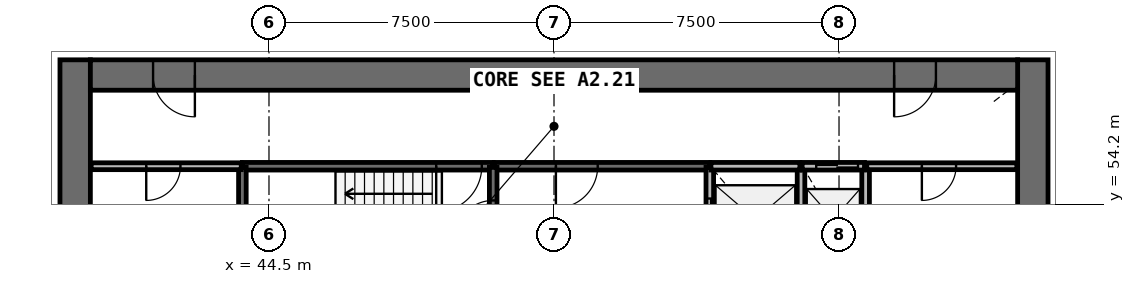
"""IFC4 building model, lengths in metres.
Left out: names, types, materials, properties, quantities, classifications, styles, units other than length and angle.
Written with IfcOpenShell. Run it as: python <this file> out.ifc"""

import sys

from ifc_helpers import new_model, si_unit, direction, frame, frame_2d, origin, place, context, subcontext, project, spatial, rectangle, extrude, source, transform, mapped, element, fill, save


model = new_model("IFC4")
c1 = context("Model", 3, precision=1e-05, world=origin(), true_north=direction((0.0, 1.0)))
c2 = subcontext(c1, "Body", "Model", "MODEL_VIEW")
j1 = project(units=[si_unit("LENGTHUNIT", "METRE"), si_unit("PLANEANGLEUNIT", "RADIAN")], contexts=[c1])
p1 = place(None, origin())
s1 = spatial("IfcSite", under=j1, at=p1, CompositionType="ELEMENT")
p2 = place(p1, origin())
s2 = spatial("IfcBuilding", under=s1, at=p2, CompositionType="ELEMENT")
p3 = place(p2, frame((0.0, 0.0, 88.0)))
s3 = spatial("IfcBuildingStorey", under=s2, at=p3, CompositionType="ELEMENT", Elevation=88.0)
p4 = place(p3, frame((64.6, 38.0, 0.0), z_axis=(0.0, 0.0, 1.0), x_axis=(0.0, 1.0, 0.0)))
e1 = element("IfcWall", 1, at=p4, inside=s3, PredefinedType="SHEAR", context=c2, shape_type="SweptSolid", body=[
    extrude(rectangle(XDim=20.0, YDim=0.8, at=frame_2d((10.0, 0.0))), origin(), (0.0, 0.0, 1.0), 4.1),
])
p5 = place(p4, frame((9.1, 0.0, 0.0)))
e2 = element("IfcOpeningElement", 2, at=p5, cuts=e1, PredefinedType="OPENING", context=c2, shape_type="SweptSolid", body=[
    extrude(rectangle(XDim=1.8, YDim=2.1, at=frame_2d((0.9, 1.05))), frame((0.0, 0.41, 0.0), z_axis=(0.0, -1.0, 0.0), x_axis=(1.0, 0.0, 0.0)), (0.0, 0.0, 1.0), 0.82),
])
p6 = place(p3, frame((39.4, 58.0, 0.0), z_axis=(0.0, 0.0, 1.0), x_axis=(0.0, -1.0, 0.0)))
e3 = element("IfcWall", 3, at=p6, inside=s3, PredefinedType="SHEAR", context=c2, shape_type="SweptSolid", body=[
    extrude(rectangle(XDim=20.0, YDim=0.8, at=frame_2d((10.0, 0.0))), origin(), (0.0, 0.0, 1.0), 4.1),
])
p7 = place(p6, frame((9.1, 0.0, 0.0)))
e4 = element("IfcOpeningElement", 4, at=p7, cuts=e3, PredefinedType="OPENING", context=c2, shape_type="SweptSolid", body=[
    extrude(rectangle(XDim=1.8, YDim=2.1, at=frame_2d((0.9, 1.05))), frame((0.0, 0.41, 0.0), z_axis=(0.0, -1.0, 0.0), x_axis=(1.0, 0.0, 0.0)), (0.0, 0.0, 1.0), 0.82),
])
p8 = place(p3, frame((64.2, 57.6, 0.0), z_axis=(0.0, 0.0, 1.0), x_axis=(-1.0, 0.0, 0.0)))
e5 = element("IfcWall", 5, at=p8, inside=s3, PredefinedType="SHEAR", context=c2, shape_type="SweptSolid", body=[
    extrude(rectangle(XDim=24.4, YDim=0.8, at=frame_2d((12.2, 0.0))), origin(), (0.0, 0.0, 1.0), 4.1),
])
p9 = place(p8, frame((21.65, 0.0, 0.0)))
e6 = element("IfcOpeningElement", 6, at=p9, cuts=e5, PredefinedType="OPENING", context=c2, shape_type="SweptSolid", body=[
    extrude(rectangle(XDim=1.1, YDim=2.1, at=frame_2d((0.55, 1.05))), frame((0.0, 0.41, 0.0), z_axis=(0.0, -1.0, 0.0), x_axis=(1.0, 0.0, 0.0)), (0.0, 0.0, 1.0), 0.82),
])
p10 = place(p8, frame((2.15, 0.0, 0.0)))
e7 = element("IfcOpeningElement", 7, at=p10, cuts=e5, PredefinedType="OPENING", context=c2, shape_type="SweptSolid", body=[
    extrude(rectangle(XDim=1.1, YDim=2.1, at=frame_2d((0.55, 1.05))), frame((0.0, 0.41, 0.0), z_axis=(0.0, -1.0, 0.0), x_axis=(1.0, 0.0, 0.0)), (0.0, 0.0, 1.0), 0.82),
])
p11 = place(p3, frame((50.4, 55.2, 0.0), z_axis=(0.0, 0.0, 1.0), x_axis=(-1.0, 0.0, 0.0)))
e8 = element("IfcWall", 8, at=p11, inside=s3, PredefinedType="SOLIDWALL", context=c2, shape_type="SweptSolid", body=[
    extrude(rectangle(XDim=6.6, YDim=0.2, at=frame_2d((3.3, 0.0))), origin(), (0.0, 0.0, 1.0), 3.7),
])
p12 = place(p11, frame((0.3, 0.0, 0.0)))
e9 = element("IfcOpeningElement", 9, at=p12, cuts=e8, PredefinedType="OPENING", context=c2, shape_type="SweptSolid", body=[
    extrude(rectangle(XDim=1.2, YDim=2.1, at=frame_2d((0.6, 1.05))), frame((0.0, 0.11, 0.0), z_axis=(0.0, -1.0, 0.0), x_axis=(1.0, 0.0, 0.0)), (0.0, 0.0, 1.0), 0.22),
])
p13 = place(p3, frame((56.1, 55.2, 0.0), z_axis=(0.0, 0.0, 1.0), x_axis=(-1.0, 0.0, 0.0)))
e10 = element("IfcWall", 10, at=p13, inside=s3, PredefinedType="SOLIDWALL", context=c2, shape_type="SweptSolid", body=[
    extrude(rectangle(XDim=5.67, YDim=0.2, at=frame_2d((2.835, 0.0))), origin(), (0.0, 0.0, 1.0), 3.7),
])
p14 = place(p13, frame((2.95, 0.0, 0.0)))
e11 = element("IfcOpeningElement", 11, at=p14, cuts=e10, PredefinedType="OPENING", context=c2, shape_type="SweptSolid", body=[
    extrude(rectangle(XDim=1.1, YDim=2.1, at=frame_2d((0.55, 1.05))), frame((0.0, 0.11, 0.0), z_axis=(0.0, -1.0, 0.0), x_axis=(1.0, 0.0, 0.0)), (0.0, 0.0, 1.0), 0.22),
])
p15 = place(p3, frame((50.4, 52.4, 0.0), z_axis=(0.0, 0.0, 1.0), x_axis=(0.0, 1.0, 0.0)))
e12 = element("IfcWall", 12, at=p15, inside=s3, PredefinedType="SOLIDWALL", context=c2, shape_type="SweptSolid", body=[
    extrude(rectangle(XDim=2.77, YDim=0.2, at=frame_2d((1.385, 0.0))), origin(), (0.0, 0.0, 1.0), 3.7),
])
p16 = place(p15, frame((0.9, 0.0, 0.0)))
e13 = element("IfcOpeningElement", 13, at=p16, cuts=e12, PredefinedType="OPENING", context=c2, shape_type="SweptSolid", body=[
    extrude(rectangle(XDim=1.0, YDim=2.1, at=frame_2d((0.5, 1.05))), frame((0.0, 0.11, 0.0), z_axis=(0.0, -1.0, 0.0), x_axis=(1.0, 0.0, 0.0)), (0.0, 0.0, 1.0), 0.22),
])
p17 = place(p3, frame((56.1, 55.17, 0.0), z_axis=(0.0, 0.0, 1.0), x_axis=(0.0, -1.0, 0.0)))
e14 = element("IfcWall", 14, at=p17, inside=s3, PredefinedType="SOLIDWALL", context=c2, shape_type="SweptSolid", body=[
    extrude(rectangle(XDim=2.77, YDim=0.2, at=frame_2d((1.385, 0.0))), origin(), (0.0, 0.0, 1.0), 3.7),
])
p18 = place(p17, frame((0.82, 0.0, 0.0)))
e15 = element("IfcOpeningElement", 15, at=p18, cuts=e14, PredefinedType="OPENING", context=c2, shape_type="SweptSolid", body=[
    extrude(rectangle(XDim=1.1, YDim=2.1, at=frame_2d((0.55, 1.05))), frame((0.0, 0.11, 0.0), z_axis=(0.0, -1.0, 0.0), x_axis=(1.0, 0.0, 0.0)), (0.0, 0.0, 1.0), 0.22),
])
for number, where, z_axis, x_axis in (
    (16, (58.5, 52.4, 0.0), (0.0, 0.0, 1.0), (0.0, 1.0, 0.0)),
    (17, (60.2, 52.4, 0.0), (0.0, 0.0, 1.0), (0.0, 1.0, 0.0)),
):
    element("IfcWall", number, at=place(p3, frame(where, z_axis=z_axis, x_axis=x_axis)), inside=s3, PredefinedType="SOLIDWALL", context=c2, shape_type="SweptSolid", body=[
        extrude(rectangle(XDim=2.8, YDim=0.2, at=frame_2d((1.4, 0.0))), origin(), (0.0, 0.0, 1.0), 3.7),
    ])
p19 = place(p3, frame((58.47, 55.2, 0.0), z_axis=(0.0, 0.0, 1.0), x_axis=(-1.0, 0.0, 0.0)))
e18 = element("IfcWall", 18, at=p19, inside=s3, PredefinedType="SOLIDWALL", context=c2, shape_type="SweptSolid", body=[
    extrude(rectangle(XDim=2.34, YDim=0.2, at=frame_2d((1.17, 0.0))), origin(), (0.0, 0.0, 1.0), 3.7),
])
p20 = place(p3, frame((43.8, 55.17, 0.0), z_axis=(0.0, 0.0, 1.0), x_axis=(0.0, -1.0, 0.0)))
e19 = element("IfcWall", 19, at=p20, inside=s3, PredefinedType="SOLIDWALL", context=c2, shape_type="SweptSolid", body=[
    extrude(rectangle(XDim=2.14, YDim=0.2, at=frame_2d((1.07, 0.0))), origin(), (0.0, 0.0, 1.0), 3.7),
])
p21 = place(p3, frame((60.17, 55.2, 0.0), z_axis=(0.0, 0.0, 1.0), x_axis=(-1.0, 0.0, 0.0)))
e20 = element("IfcWall", 20, at=p21, inside=s3, PredefinedType="SOLIDWALL", context=c2, shape_type="SweptSolid", body=[
    extrude(rectangle(XDim=1.64, YDim=0.2, at=frame_2d((0.82, 0.0))), origin(), (0.0, 0.0, 1.0), 3.7),
])
p22 = place(p21, frame((0.17, 0.0, 0.0)))
e21 = element("IfcOpeningElement", 21, at=p22, cuts=e20, PredefinedType="OPENING", context=c2, shape_type="SweptSolid", body=[
    extrude(rectangle(XDim=1.1, YDim=2.1, at=frame_2d((0.55, 1.05))), frame((0.0, 0.11, 0.0), z_axis=(0.0, -1.0, 0.0), x_axis=(1.0, 0.0, 0.0)), (0.0, 0.0, 1.0), 0.22),
])
p23 = place(p3, frame((64.18, 55.2, 0.0), z_axis=(0.0, 0.0, 1.0), x_axis=(-1.0, 0.0, 0.0)))
e22 = element("IfcWall", 22, at=p23, inside=s3, PredefinedType="PARTITIONING", context=c2, shape_type="SweptSolid", body=[
    extrude(rectangle(XDim=3.95, YDim=0.18, at=frame_2d((1.975, 0.0))), origin(), (0.0, 0.0, 1.0), 3.7),
])
p24 = place(p23, frame((1.6, 0.0, 0.0)))
e23 = element("IfcOpeningElement", 23, at=p24, cuts=e22, PredefinedType="OPENING", context=c2, shape_type="SweptSolid", body=[
    extrude(rectangle(XDim=0.9, YDim=2.1, at=frame_2d((0.45, 1.05))), frame((0.0, 0.1, 0.0), z_axis=(0.0, -1.0, 0.0), x_axis=(1.0, 0.0, 0.0)), (0.0, 0.0, 1.0), 0.2),
])
p25 = place(p3, frame((43.77, 55.2, 0.0), z_axis=(0.0, 0.0, 1.0), x_axis=(-1.0, 0.0, 0.0)))
e24 = element("IfcWall", 24, at=p25, inside=s3, PredefinedType="PARTITIONING", context=c2, shape_type="SweptSolid", body=[
    extrude(rectangle(XDim=3.95, YDim=0.18, at=frame_2d((1.975, 0.0))), origin(), (0.0, 0.0, 1.0), 3.7),
])
p26 = place(p25, frame((1.6, 0.0, 0.0)))
e25 = element("IfcOpeningElement", 25, at=p26, cuts=e24, PredefinedType="OPENING", context=c2, shape_type="SweptSolid", body=[
    extrude(rectangle(XDim=0.9, YDim=2.1, at=frame_2d((0.45, 1.05))), frame((0.0, 0.1, 0.0), z_axis=(0.0, -1.0, 0.0), x_axis=(1.0, 0.0, 0.0)), (0.0, 0.0, 1.0), 0.2),
])
m1 = source(origin(), c2, "Body", "SweptSolid", [
    extrude(rectangle(XDim=1.1, YDim=2.1, at=frame_2d((0.55, 1.05))), frame((0.0, 0.025, 0.0), z_axis=(0.0, -1.0, 0.0), x_axis=(1.0, 0.0, 0.0)), (0.0, 0.0, 1.0), 0.05),
])
p27 = place(p18, origin())
e26 = element("IfcDoor", 26, at=p27, inside=s3, OperationType="DOUBLE_DOOR_SLIDING", PredefinedType="USERDEFINED", context=c2, shape_type="MappedRepresentation", body=[
    mapped(m1, transform((0.0, 0.0, 0.0), scale=1.0)),
])
fill(e15, e26)
p28 = place(p22, origin())
e27 = element("IfcDoor", 27, at=p28, inside=s3, OperationType="DOUBLE_DOOR_SLIDING", PredefinedType="USERDEFINED", context=c2, shape_type="MappedRepresentation", body=[
    mapped(m1, transform((0.0, 0.0, 0.0), scale=1.0)),
])
fill(e21, e27)
m2 = source(origin(), c2, "Body", "SweptSolid", [
    extrude(rectangle(XDim=1.2, YDim=2.1, at=frame_2d((0.6, 1.05))), frame((0.0, 0.025, 0.0), z_axis=(0.0, -1.0, 0.0), x_axis=(1.0, 0.0, 0.0)), (0.0, 0.0, 1.0), 0.05),
])
p29 = place(p12, origin())
e28 = element("IfcDoor", 28, at=p29, inside=s3, OperationType="SINGLE_SWING_RIGHT", PredefinedType="DOOR", context=c2, shape_type="MappedRepresentation", body=[
    mapped(m2, transform((0.0, 0.0, 0.0), scale=1.0)),
])
fill(e9, e28)
m3 = source(origin(), c2, "Body", "SweptSolid", [
    extrude(rectangle(XDim=1.0, YDim=2.1, at=frame_2d((0.5, 1.05))), frame((0.0, 0.025, 0.0), z_axis=(0.0, -1.0, 0.0), x_axis=(1.0, 0.0, 0.0)), (0.0, 0.0, 1.0), 0.05),
])
p30 = place(p16, origin())
e29 = element("IfcDoor", 29, at=p30, inside=s3, OperationType="SINGLE_SWING_LEFT", PredefinedType="DOOR", context=c2, shape_type="MappedRepresentation", body=[
    mapped(m3, transform((0.0, 0.0, 0.0), scale=1.0)),
])
fill(e13, e29)
m4 = source(origin(), c2, "Body", "SweptSolid", [
    extrude(rectangle(XDim=1.1, YDim=2.1, at=frame_2d((0.55, 1.05))), frame((0.0, 0.025, 0.0), z_axis=(0.0, -1.0, 0.0), x_axis=(1.0, 0.0, 0.0)), (0.0, 0.0, 1.0), 0.05),
])
p31 = place(p14, origin())
e30 = element("IfcDoor", 30, at=p31, inside=s3, OperationType="SINGLE_SWING_RIGHT", PredefinedType="DOOR", context=c2, shape_type="MappedRepresentation", body=[
    mapped(m4, transform((0.0, 0.0, 0.0), scale=1.0)),
])
fill(e11, e30)
m5 = source(origin(), c2, "Body", "SweptSolid", [
    extrude(rectangle(XDim=1.1, YDim=2.1, at=frame_2d((0.55, 1.05))), frame((0.0, 0.025, 0.0), z_axis=(0.0, -1.0, 0.0), x_axis=(1.0, 0.0, 0.0)), (0.0, 0.0, 1.0), 0.05),
])
p32 = place(p9, origin())
e31 = element("IfcDoor", 31, at=p32, inside=s3, OperationType="SINGLE_SWING_LEFT", PredefinedType="DOOR", context=c2, shape_type="MappedRepresentation", body=[
    mapped(m5, transform((0.0, 0.0, 0.0), scale=1.0)),
])
fill(e6, e31)
p33 = place(p10, origin())
e32 = element("IfcDoor", 32, at=p33, inside=s3, OperationType="SINGLE_SWING_RIGHT", PredefinedType="DOOR", context=c2, shape_type="MappedRepresentation", body=[
    mapped(m5, transform((0.0, 0.0, 0.0), scale=1.0)),
])
fill(e7, e32)
m6 = source(origin(), c2, "Body", "SweptSolid", [
    extrude(rectangle(XDim=0.9, YDim=2.1, at=frame_2d((0.45, 1.05))), frame((0.0, 0.025, 0.0), z_axis=(0.0, -1.0, 0.0), x_axis=(1.0, 0.0, 0.0)), (0.0, 0.0, 1.0), 0.05),
])
p34 = place(p26, origin())
e33 = element("IfcDoor", 33, at=p34, inside=s3, OperationType="SINGLE_SWING_RIGHT", PredefinedType="DOOR", context=c2, shape_type="MappedRepresentation", body=[
    mapped(m6, transform((0.0, 0.0, 0.0), scale=1.0)),
])
fill(e25, e33)
p35 = place(p24, origin())
e34 = element("IfcDoor", 34, at=p35, inside=s3, OperationType="SINGLE_SWING_RIGHT", PredefinedType="DOOR", context=c2, shape_type="MappedRepresentation", body=[
    mapped(m6, transform((0.0, 0.0, 0.0), scale=1.0)),
])
fill(e23, e34)
save(model, sys.argv[1])
